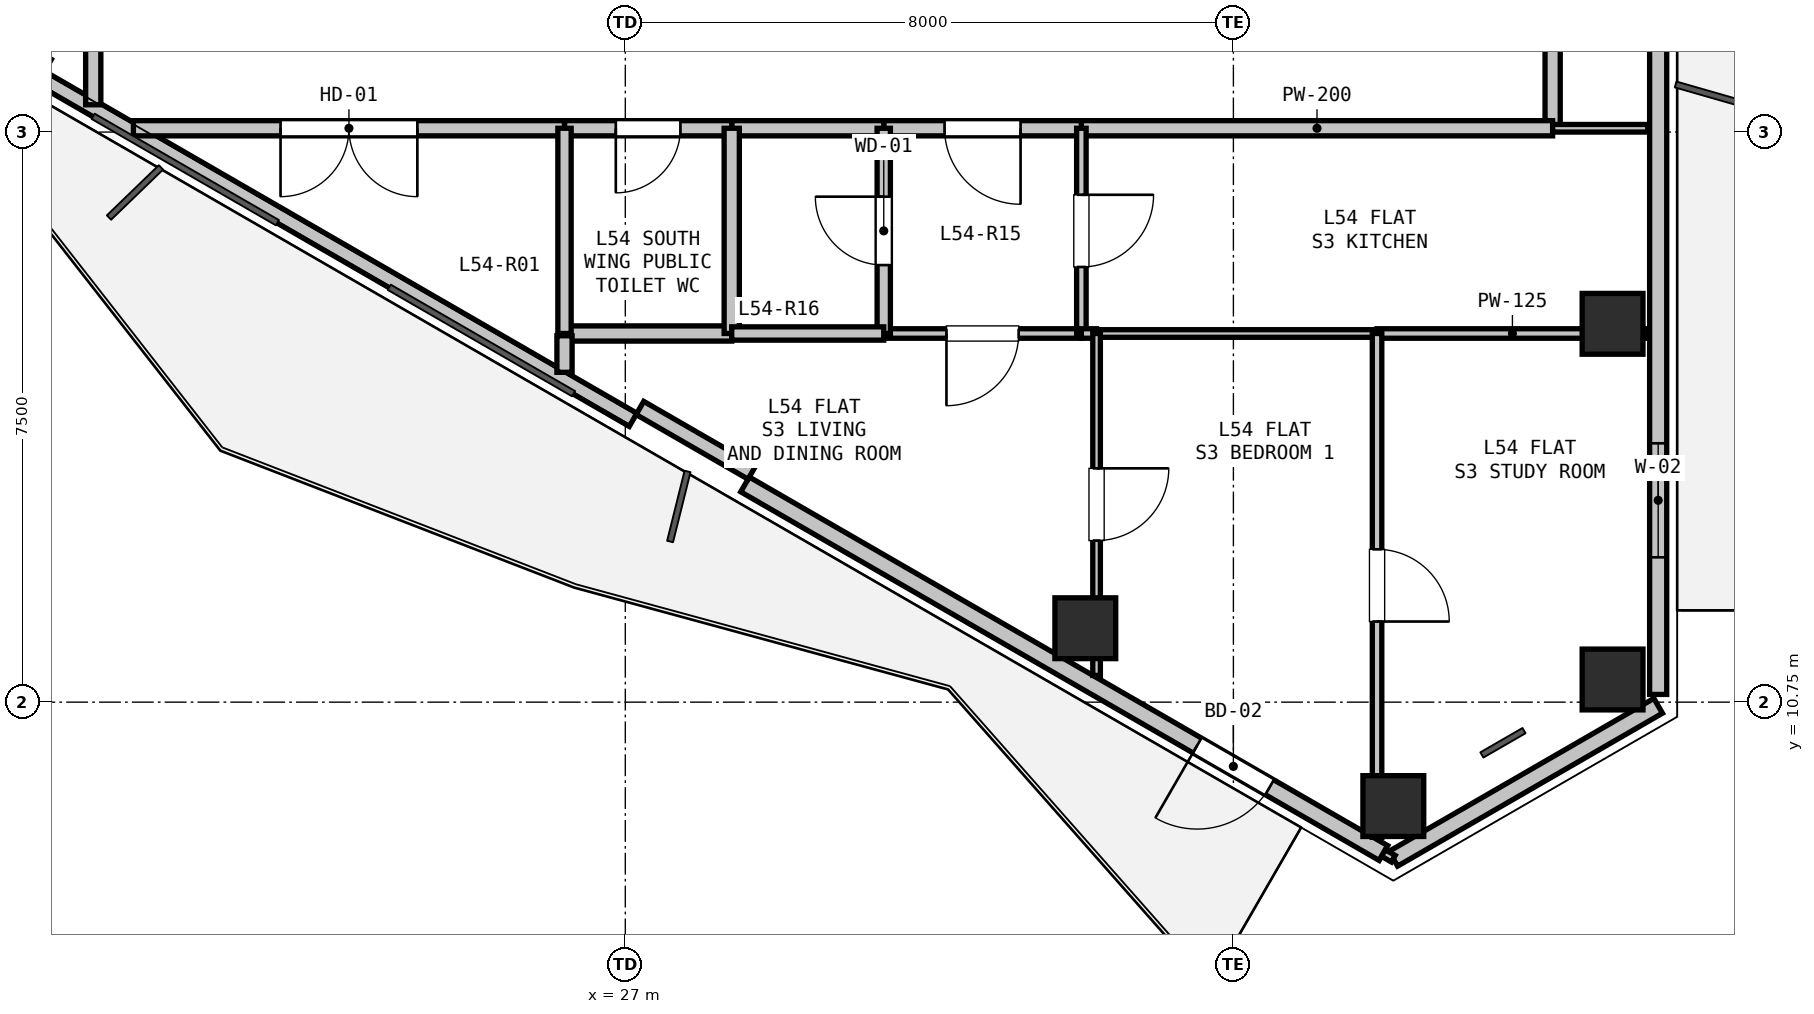
"""IFC4 building model, lengths in metres.
Left out: names, types, materials, properties, quantities, classifications, styles, units other than length and angle.
Written with IfcOpenShell. Run it as: python <this file> out.ifc"""

import sys

from ifc_helpers import new_model, si_unit, direction, frame, frame_2d, origin, origin_2d, place, context, subcontext, project, spatial, rectangle, hollow_rectangle, extrude, element, fill, save


model = new_model("IFC4")
c1 = context("Model", 3, precision=1e-05, world=origin(), true_north=direction((0.0, 1.0)))
c2 = subcontext(c1, "Body", "Model", "MODEL_VIEW")
j1 = project(units=[si_unit("LENGTHUNIT", "METRE"), si_unit("PLANEANGLEUNIT", "RADIAN")], contexts=[c1])
p1 = place(None, origin())
s1 = spatial("IfcSite", under=j1, at=p1, CompositionType="ELEMENT")
p2 = place(p1, origin())
s2 = spatial("IfcBuilding", under=s1, at=p2, CompositionType="ELEMENT")
p3 = place(p2, frame((0.0, 0.0, 195.3)))
s3 = spatial("IfcBuildingStorey", under=s2, at=p3, CompositionType="ELEMENT", Elevation=195.3)
for number, where, z_axis, x_axis in (
    (1, (39.988, 15.727, 0.0), (0.0, 0.0, 1.0), (1.0, 0.0, 0.0)),
    (2, (39.988, 11.048, 0.0), (0.0, 0.0, 1.0), (1.0, 0.0, 0.0)),
    (3, (37.104, 9.383, 0.0), (0.0, 0.0, 1.0), (1.0, 0.0, 0.0)),
    (4, (33.052, 11.722, 0.0), (0.0, 0.0, 1.0), (1.0, 0.0, 0.0)),
):
    element("IfcColumn", number, at=place(p3, frame(where, z_axis=z_axis, x_axis=x_axis)), inside=s3, PredefinedType="COLUMN", context=c2, shape_type="SweptSolid", body=[
        extrude(hollow_rectangle(XDim=0.8, YDim=0.8, WallThickness=0.025, at=origin_2d()), origin(), (0.0, 0.0, 1.0), 3.3),
    ])
p4 = place(p3, frame((40.588, 10.702, 0.0), z_axis=(0.0, 0.0, 1.0), x_axis=(-0.866023907196, -0.500002592159, 0.0)))
e5 = element("IfcWall", 5, at=p4, inside=s3, PredefinedType="SOLIDWALL", context=c2, shape_type="SweptSolid", body=[
    extrude(rectangle(XDim=4.023, YDim=0.225, at=frame_2d((2.012, 0.0))), origin(), (0.0, 0.0, 1.0), 2.69),
])
p5 = place(p3, frame((40.588, 20.551, 0.0), z_axis=(0.0, 0.0, 1.0), x_axis=(0.0, -1.0, 0.0)))
e6 = element("IfcWall", 6, at=p5, inside=s3, PredefinedType="SOLIDWALL", context=c2, shape_type="SweptSolid", body=[
    extrude(rectangle(XDim=9.699, YDim=0.225, at=frame_2d((4.85, 0.0))), origin(), (0.0, 0.0, 1.0), 2.69),
])
p6 = place(p5, frame((6.395, 0.0, 0.9)))
e7 = element("IfcOpeningElement", 7, at=p6, cuts=e6, PredefinedType="OPENING", context=c2, shape_type="SweptSolid", body=[
    extrude(rectangle(XDim=1.5, YDim=1.5, at=frame_2d((0.75, 0.75))), frame((0.0, 0.123, 0.0), z_axis=(0.0, -1.0, 0.0), x_axis=(1.0, 0.0, 0.0)), (0.0, 0.0, 1.0), 0.245),
])
p7 = place(p3, frame((36.974, 8.765, 0.0), z_axis=(0.0, 0.0, 1.0), x_axis=(-0.866016233231, 0.500015883528, 0.0)))
e8 = element("IfcWall", 8, at=p7, inside=s3, PredefinedType="SOLIDWALL", context=c2, shape_type="SweptSolid", body=[
    extrude(rectangle(XDim=9.699, YDim=0.225, at=frame_2d((4.85, 0.0))), origin(), (0.0, 0.0, 1.0), 2.69),
])
p8 = place(p7, frame((1.73, 0.0, 0.0)))
e9 = element("IfcOpeningElement", 9, at=p8, cuts=e8, PredefinedType="OPENING", context=c2, shape_type="SweptSolid", body=[
    extrude(rectangle(XDim=1.1, YDim=2.1, at=frame_2d((0.55, 1.05))), frame((0.0, 0.123, 0.0), z_axis=(0.0, -1.0, 0.0), x_axis=(1.0, 0.0, 0.0)), (0.0, 0.0, 1.0), 0.245),
])
p9 = place(p3, frame((27.102, 14.464, 0.0), z_axis=(0.0, 0.0, 1.0), x_axis=(-0.866020680503, 0.500008180874, 0.0)))
e10 = element("IfcWall", 10, at=p9, inside=s3, PredefinedType="PARAPET", context=c2, shape_type="SweptSolid", body=[
    extrude(rectangle(XDim=8.999, YDim=0.2, at=frame_2d((4.5, 0.0))), origin(), (0.0, 0.0, 1.0), 0.2),
])
p10 = place(p3, frame((28.665, 13.77, 0.0), z_axis=(0.0, 0.0, 1.0), x_axis=(-0.866025371046, 0.500000056704, 0.0)))
e11 = element("IfcWall", 11, at=p10, inside=s3, PredefinedType="PARAPET", context=c2, shape_type="SweptSolid", body=[
    extrude(rectangle(XDim=1.7, YDim=0.2, at=frame_2d((0.85, 0.0))), origin(), (0.0, 0.0, 1.0), 2.69),
])
p11 = place(p3, frame((39.2, 19.9, 0.0), z_axis=(0.0, 0.0, 1.0), x_axis=(0.0, -1.0, 0.0)))
e12 = element("IfcWall", 12, at=p11, inside=s3, PredefinedType="PARTITIONING", context=c2, shape_type="SweptSolid", body=[
    extrude(rectangle(XDim=1.6, YDim=0.2, at=frame_2d((0.8, 0.0))), origin(), (0.0, 0.0, 1.0), 3.07),
])
p12 = place(p3, frame((39.2, 18.3, 0.0), z_axis=(0.0, 0.0, 1.0), x_axis=(-1.0, 0.0, 0.0)))
e13 = element("IfcWall", 13, at=p12, inside=s3, PredefinedType="PARTITIONING", context=c2, shape_type="SweptSolid", body=[
    extrude(rectangle(XDim=6.2, YDim=0.2, at=frame_2d((3.1, 0.0))), origin(), (0.0, 0.0, 1.0), 2.518),
])
p13 = place(p3, frame((33.0, 18.3, 0.0), z_axis=(0.0, 0.0, 1.0), x_axis=(-1.0, 0.0, 0.0)))
e14 = element("IfcWall", 14, at=p13, inside=s3, PredefinedType="PARTITIONING", context=c2, shape_type="SweptSolid", body=[
    extrude(rectangle(XDim=2.6, YDim=0.2, at=frame_2d((1.3, 0.0))), origin(), (0.0, 0.0, 1.0), 3.07),
])
p14 = place(p13, frame((0.8, 0.0, 0.0)))
e15 = element("IfcOpeningElement", 15, at=p14, cuts=e14, PredefinedType="OPENING", context=c2, shape_type="SweptSolid", body=[
    extrude(rectangle(XDim=1.0, YDim=2.15, at=frame_2d((0.5, 1.075))), frame((0.0, 0.11, 0.0), z_axis=(0.0, -1.0, 0.0), x_axis=(1.0, 0.0, 0.0)), (0.0, 0.0, 1.0), 0.22),
])
p15 = place(p3, frame((30.4, 18.3, 0.0), z_axis=(0.0, 0.0, 1.0), x_axis=(-1.0, 0.0, 0.0)))
e16 = element("IfcWall", 16, at=p15, inside=s3, PredefinedType="PARTITIONING", context=c2, shape_type="SweptSolid", body=[
    extrude(rectangle(XDim=2.0, YDim=0.2, at=frame_2d((1.0, 0.0))), origin(), (0.0, 0.0, 1.0), 3.07),
])
p16 = place(p3, frame((28.4, 18.3, 0.0), z_axis=(0.0, 0.0, 1.0), x_axis=(-1.0, 0.0, 0.0)))
e17 = element("IfcWall", 17, at=p16, inside=s3, PredefinedType="PARTITIONING", context=c2, shape_type="SweptSolid", body=[
    extrude(rectangle(XDim=2.2, YDim=0.2, at=frame_2d((1.1, 0.0))), origin(), (0.0, 0.0, 1.0), 3.07),
])
p17 = place(p16, frame((0.675, 0.0, 0.0)))
e18 = element("IfcOpeningElement", 18, at=p17, cuts=e17, PredefinedType="OPENING", context=c2, shape_type="SweptSolid", body=[
    extrude(rectangle(XDim=0.85, YDim=2.1, at=frame_2d((0.425, 1.05))), frame((0.0, 0.11, 0.0), z_axis=(0.0, -1.0, 0.0), x_axis=(1.0, 0.0, 0.0)), (0.0, 0.0, 1.0), 0.22),
])
p18 = place(p3, frame((26.2, 18.3, 0.0), z_axis=(0.0, 0.0, 1.0), x_axis=(-1.0, 0.0, 0.0)))
e19 = element("IfcWall", 19, at=p18, inside=s3, PredefinedType="PARTITIONING", context=c2, shape_type="SweptSolid", body=[
    extrude(rectangle(XDim=5.672, YDim=0.2, at=frame_2d((2.836, 0.0))), origin(), (0.0, 0.0, 1.0), 2.365),
])
p19 = place(p18, frame((1.936, 0.0, 0.0)))
e20 = element("IfcOpeningElement", 20, at=p19, cuts=e19, PredefinedType="OPENING", context=c2, shape_type="SweptSolid", body=[
    extrude(rectangle(XDim=1.8, YDim=2.2, at=frame_2d((0.9, 1.1))), frame((0.0, 0.11, 0.0), z_axis=(0.0, -1.0, 0.0), x_axis=(1.0, 0.0, 0.0)), (0.0, 0.0, 1.0), 0.22),
])
p20 = place(p3, frame((20.0, 18.609, 0.0), z_axis=(0.0, 0.0, 1.0), x_axis=(0.0, 1.0, 0.0)))
e21 = element("IfcWall", 21, at=p20, inside=s3, PredefinedType="PARTITIONING", context=c2, shape_type="SweptSolid", body=[
    extrude(rectangle(XDim=2.141, YDim=0.2, at=frame_2d((1.071, 0.0))), origin(), (0.0, 0.0, 1.0), 2.365),
])
p21 = place(p3, frame((33.0, 15.6, 0.0), z_axis=(0.0, 0.0, 1.0), x_axis=(-1.0, 0.0, 0.0)))
e22 = element("IfcWall", 22, at=p21, inside=s3, PredefinedType="PARTITIONING", context=c2, shape_type="SweptSolid", body=[
    extrude(rectangle(XDim=2.6, YDim=0.125, at=frame_2d((1.3, 0.0))), origin(), (0.0, 0.0, 1.0), 3.07),
])
p22 = place(p21, frame((0.825, 0.0, 0.0)))
e23 = element("IfcOpeningElement", 23, at=p22, cuts=e22, PredefinedType="OPENING", context=c2, shape_type="SweptSolid", body=[
    extrude(rectangle(XDim=0.95, YDim=2.1, at=frame_2d((0.475, 1.05))), frame((0.0, 0.073, 0.0), z_axis=(0.0, -1.0, 0.0), x_axis=(1.0, 0.0, 0.0)), (0.0, 0.0, 1.0), 0.145),
])
p23 = place(p3, frame((30.4, 15.6, 0.0), z_axis=(0.0, 0.0, 1.0), x_axis=(0.0, 1.0, 0.0)))
e24 = element("IfcWall", 24, at=p23, inside=s3, PredefinedType="PLUMBINGWALL", context=c2, shape_type="SweptSolid", body=[
    extrude(rectangle(XDim=2.7, YDim=0.175, at=frame_2d((1.35, 0.0))), origin(), (0.0, 0.0, 1.0), 3.07),
])
p24 = place(p23, frame((0.9, 0.0, 0.0)))
e25 = element("IfcOpeningElement", 25, at=p24, cuts=e24, PredefinedType="OPENING", context=c2, shape_type="SweptSolid", body=[
    extrude(rectangle(XDim=0.9, YDim=2.1, at=frame_2d((0.45, 1.05))), frame((0.0, 0.097, 0.0), z_axis=(0.0, -1.0, 0.0), x_axis=(1.0, 0.0, 0.0)), (0.0, 0.0, 1.0), 0.195),
])
p25 = place(p3, frame((33.0, 18.3, 0.0), z_axis=(0.0, 0.0, 1.0), x_axis=(0.0, -1.0, 0.0)))
e26 = element("IfcWall", 26, at=p25, inside=s3, PredefinedType="PARTITIONING", context=c2, shape_type="SweptSolid", body=[
    extrude(rectangle(XDim=2.7, YDim=0.125, at=frame_2d((1.35, 0.0))), origin(), (0.0, 0.0, 1.0), 3.07),
])
p26 = place(p25, frame((0.875, 0.0, 0.0)))
e27 = element("IfcOpeningElement", 27, at=p26, cuts=e26, PredefinedType="OPENING", context=c2, shape_type="SweptSolid", body=[
    extrude(rectangle(XDim=0.95, YDim=2.1, at=frame_2d((0.475, 1.05))), frame((0.0, 0.073, 0.0), z_axis=(0.0, -1.0, 0.0), x_axis=(1.0, 0.0, 0.0)), (0.0, 0.0, 1.0), 0.145),
])
p27 = place(p3, frame((28.4, 15.6, 0.0), z_axis=(0.0, 0.0, 1.0), x_axis=(-1.0, 0.0, 0.0)))
e28 = element("IfcWall", 28, at=p27, inside=s3, PredefinedType="PARTITIONING", context=c2, shape_type="SweptSolid", body=[
    extrude(rectangle(XDim=2.2, YDim=0.2, at=frame_2d((1.1, 0.0))), origin(), (0.0, 0.0, 1.0), 2.365),
])
p28 = place(p3, frame((26.2, 15.6, 0.0), z_axis=(0.0, 0.0, 1.0), x_axis=(0.0, 1.0, 0.0)))
e29 = element("IfcWall", 29, at=p28, inside=s3, PredefinedType="PLUMBINGWALL", context=c2, shape_type="SweptSolid", body=[
    extrude(rectangle(XDim=2.7, YDim=0.175, at=frame_2d((1.35, 0.0))), origin(), (0.0, 0.0, 1.0), 2.365),
])
p29 = place(p3, frame((28.4, 18.3, 0.0), z_axis=(0.0, 0.0, 1.0), x_axis=(0.0, -1.0, 0.0)))
e30 = element("IfcWall", 30, at=p29, inside=s3, PredefinedType="PARTITIONING", context=c2, shape_type="SweptSolid", body=[
    extrude(rectangle(XDim=2.7, YDim=0.2, at=frame_2d((1.35, 0.0))), origin(), (0.0, 0.0, 1.0), 3.07),
])
p30 = place(p3, frame((30.4, 15.6, 0.0), z_axis=(0.0, 0.0, 1.0), x_axis=(-1.0, 0.0, 0.0)))
e31 = element("IfcWall", 31, at=p30, inside=s3, PredefinedType="PLUMBINGWALL", context=c2, shape_type="SweptSolid", body=[
    extrude(rectangle(XDim=2.0, YDim=0.175, at=frame_2d((1.0, 0.0))), origin(), (0.0, 0.0, 1.0), 3.07),
])
p31 = place(p3, frame((39.2, 18.3, 0.0), z_axis=(0.0, 0.0, 1.0), x_axis=(1.0, 0.0, 0.0)))
e32 = element("IfcWall", 32, at=p31, inside=s3, PredefinedType="PARTITIONING", context=c2, shape_type="SweptSolid", body=[
    extrude(rectangle(XDim=1.252, YDim=0.1, at=frame_2d((0.626, 0.0))), origin(), (0.0, 0.0, 1.0), 2.365),
])
p32 = place(p3, frame((40.452, 15.6, 0.0), z_axis=(0.0, 0.0, 1.0), x_axis=(-1.0, 0.0, 0.0)))
e33 = element("IfcWall", 33, at=p32, inside=s3, PredefinedType="PARTITIONING", context=c2, shape_type="SweptSolid", body=[
    extrude(rectangle(XDim=3.562, YDim=0.125, at=frame_2d((1.781, 0.0))), origin(), (0.0, 0.0, 1.0), 2.518),
])
p33 = place(p3, frame((36.89, 15.6, 0.0), z_axis=(0.0, 0.0, 1.0), x_axis=(-1.0, 0.0, 0.0)))
e34 = element("IfcWall", 34, at=p33, inside=s3, PredefinedType="PARTITIONING", context=c2, shape_type="SweptSolid", body=[
    extrude(rectangle(XDim=3.69, YDim=0.1, at=frame_2d((1.845, 0.0))), origin(), (0.0, 0.0, 1.0), 3.07),
])
p34 = place(p3, frame((33.2, 15.6, 0.0), z_axis=(0.0, 0.0, 1.0), x_axis=(-1.0, 0.0, 0.0)))
e35 = element("IfcWall", 35, at=p34, inside=s3, PredefinedType="PARTITIONING", context=c2, shape_type="SweptSolid", body=[
    extrude(rectangle(XDim=0.2, YDim=0.125, at=frame_2d((0.1, 0.0))), origin(), (0.0, 0.0, 1.0), 3.07),
])
p35 = place(p3, frame((26.2, 15.57, 0.0), z_axis=(0.0, 0.0, 1.0), x_axis=(0.0, -1.0, 0.0)))
e36 = element("IfcWall", 36, at=p35, inside=s3, PredefinedType="PARTITIONING", context=c2, shape_type="SweptSolid", body=[
    extrude(rectangle(XDim=0.481, YDim=0.2, at=frame_2d((0.24, 0.0))), origin(), (0.0, 0.0, 1.0), 2.365),
])
p36 = place(p3, frame((33.2, 15.6, 0.0), z_axis=(0.0, 0.0, 1.0), x_axis=(0.0, -1.0, 0.0)))
e37 = element("IfcWall", 37, at=p36, inside=s3, PredefinedType="PARTITIONING", context=c2, shape_type="SweptSolid", body=[
    extrude(rectangle(XDim=4.499, YDim=0.1, at=frame_2d((2.249, 0.0))), origin(), (0.0, 0.0, 1.0), 3.07),
])
p37 = place(p36, frame((1.774, 0.0, 0.0)))
e38 = element("IfcOpeningElement", 38, at=p37, cuts=e37, PredefinedType="OPENING", context=c2, shape_type="SweptSolid", body=[
    extrude(rectangle(XDim=0.95, YDim=2.1, at=frame_2d((0.475, 1.05))), frame((0.0, 0.06, 0.0), z_axis=(0.0, -1.0, 0.0), x_axis=(1.0, 0.0, 0.0)), (0.0, 0.0, 1.0), 0.12),
])
p38 = place(p3, frame((36.89, 15.6, 0.0), z_axis=(0.0, 0.0, 1.0), x_axis=(0.0, -1.0, 0.0)))
e39 = element("IfcWall", 39, at=p38, inside=s3, PredefinedType="PARTITIONING", context=c2, shape_type="SweptSolid", body=[
    extrude(rectangle(XDim=6.629, YDim=0.125, at=frame_2d((3.314, 0.0))), origin(), (0.0, 0.0, 1.0), 3.07),
])
p39 = place(p38, frame((2.839, 0.0, 0.0)))
e40 = element("IfcOpeningElement", 40, at=p39, cuts=e39, PredefinedType="OPENING", context=c2, shape_type="SweptSolid", body=[
    extrude(rectangle(XDim=0.95, YDim=2.1, at=frame_2d((0.475, 1.05))), frame((0.0, 0.073, 0.0), z_axis=(0.0, -1.0, 0.0), x_axis=(1.0, 0.0, 0.0)), (0.0, 0.0, 1.0), 0.145),
])
p40 = place(p3, frame((37.104, 8.69, 0.0), z_axis=(0.0, 0.0, 1.0), x_axis=(-0.865017048845, 0.50174246901, 0.0)))
e41 = element("IfcWall", 41, at=p40, inside=s3, PredefinedType="PARTITIONING", context=c2, shape_type="SweptSolid", body=[
    extrude(rectangle(XDim=0.15, YDim=0.1, at=frame_2d((0.075, 0.0))), origin(), (0.0, 0.0, 1.0), 3.07),
])
p41 = place(p6, origin())
e42 = element("IfcWindow", 42, at=p41, inside=s3, PartitioningType="SINGLE_PANEL", PredefinedType="WINDOW", context=c2, shape_type="SweptSolid", body=[
    extrude(rectangle(XDim=1.5, YDim=1.5, at=frame_2d((0.75, 0.75))), frame((0.0, 0.03, 0.0), z_axis=(0.0, -1.0, 0.0), x_axis=(1.0, 0.0, 0.0)), (0.0, 0.0, 1.0), 0.06),
])
fill(e7, e42)
p42 = place(p8, origin())
e43 = element("IfcDoor", 43, at=p42, inside=s3, OperationType="SINGLE_SWING_RIGHT", PredefinedType="DOOR", context=c2, shape_type="SweptSolid", body=[
    extrude(rectangle(XDim=1.1, YDim=2.1, at=frame_2d((0.55, 1.05))), frame((0.0, 0.025, 0.0), z_axis=(0.0, -1.0, 0.0), x_axis=(1.0, 0.0, 0.0)), (0.0, 0.0, 1.0), 0.05),
])
fill(e9, e43)
p43 = place(p14, origin())
e44 = element("IfcDoor", 44, at=p43, inside=s3, OperationType="SINGLE_SWING_LEFT", PredefinedType="DOOR", context=c2, shape_type="SweptSolid", body=[
    extrude(rectangle(XDim=1.0, YDim=2.15, at=frame_2d((0.5, 1.075))), frame((0.0, 0.025, 0.0), z_axis=(0.0, -1.0, 0.0), x_axis=(1.0, 0.0, 0.0)), (0.0, 0.0, 1.0), 0.05),
])
fill(e15, e44)
p44 = place(p17, origin())
e45 = element("IfcDoor", 45, at=p44, inside=s3, OperationType="SINGLE_SWING_RIGHT", PredefinedType="DOOR", context=c2, shape_type="SweptSolid", body=[
    extrude(rectangle(XDim=0.85, YDim=2.1, at=frame_2d((0.425, 1.05))), frame((0.0, 0.025, 0.0), z_axis=(0.0, -1.0, 0.0), x_axis=(1.0, 0.0, 0.0)), (0.0, 0.0, 1.0), 0.05),
])
fill(e18, e45)
p45 = place(p19, origin())
e46 = element("IfcDoor", 46, at=p45, inside=s3, OperationType="DOUBLE_DOOR_SINGLE_SWING", PredefinedType="DOOR", context=c2, shape_type="SweptSolid", body=[
    extrude(rectangle(XDim=1.8, YDim=2.2, at=frame_2d((0.9, 1.1))), frame((0.0, 0.025, 0.0), z_axis=(0.0, -1.0, 0.0), x_axis=(1.0, 0.0, 0.0)), (0.0, 0.0, 1.0), 0.05),
])
fill(e20, e46)
p46 = place(p24, origin())
e47 = element("IfcDoor", 47, at=p46, inside=s3, OperationType="SINGLE_SWING_RIGHT", PredefinedType="DOOR", context=c2, shape_type="SweptSolid", body=[
    extrude(rectangle(XDim=0.9, YDim=2.1, at=frame_2d((0.45, 1.05))), frame((0.0, 0.025, 0.0), z_axis=(0.0, -1.0, 0.0), x_axis=(1.0, 0.0, 0.0)), (0.0, 0.0, 1.0), 0.05),
])
fill(e25, e47)
p47 = place(p26, origin())
e48 = element("IfcDoor", 48, at=p47, inside=s3, OperationType="SINGLE_SWING_LEFT", PredefinedType="DOOR", context=c2, shape_type="SweptSolid", body=[
    extrude(rectangle(XDim=0.95, YDim=2.1, at=frame_2d((0.475, 1.05))), frame((0.0, 0.025, 0.0), z_axis=(0.0, -1.0, 0.0), x_axis=(1.0, 0.0, 0.0)), (0.0, 0.0, 1.0), 0.05),
])
fill(e27, e48)
p48 = place(p22, origin())
e49 = element("IfcDoor", 49, at=p48, inside=s3, OperationType="SINGLE_SWING_RIGHT", PredefinedType="DOOR", context=c2, shape_type="SweptSolid", body=[
    extrude(rectangle(XDim=0.95, YDim=2.1, at=frame_2d((0.475, 1.05))), frame((0.0, 0.025, 0.0), z_axis=(0.0, -1.0, 0.0), x_axis=(1.0, 0.0, 0.0)), (0.0, 0.0, 1.0), 0.05),
])
fill(e23, e49)
p49 = place(p37, origin())
e50 = element("IfcDoor", 50, at=p49, inside=s3, OperationType="SINGLE_SWING_LEFT", PredefinedType="DOOR", context=c2, shape_type="SweptSolid", body=[
    extrude(rectangle(XDim=0.95, YDim=2.1, at=frame_2d((0.475, 1.05))), frame((0.0, 0.025, 0.0), z_axis=(0.0, -1.0, 0.0), x_axis=(1.0, 0.0, 0.0)), (0.0, 0.0, 1.0), 0.05),
])
fill(e38, e50)
p50 = place(p39, origin())
e51 = element("IfcDoor", 51, at=p50, inside=s3, OperationType="SINGLE_SWING_RIGHT", PredefinedType="DOOR", context=c2, shape_type="SweptSolid", body=[
    extrude(rectangle(XDim=0.95, YDim=2.1, at=frame_2d((0.475, 1.05))), frame((0.0, 0.025, 0.0), z_axis=(0.0, -1.0, 0.0), x_axis=(1.0, 0.0, 0.0)), (0.0, 0.0, 1.0), 0.05),
])
fill(e40, e51)
save(model, sys.argv[1])
